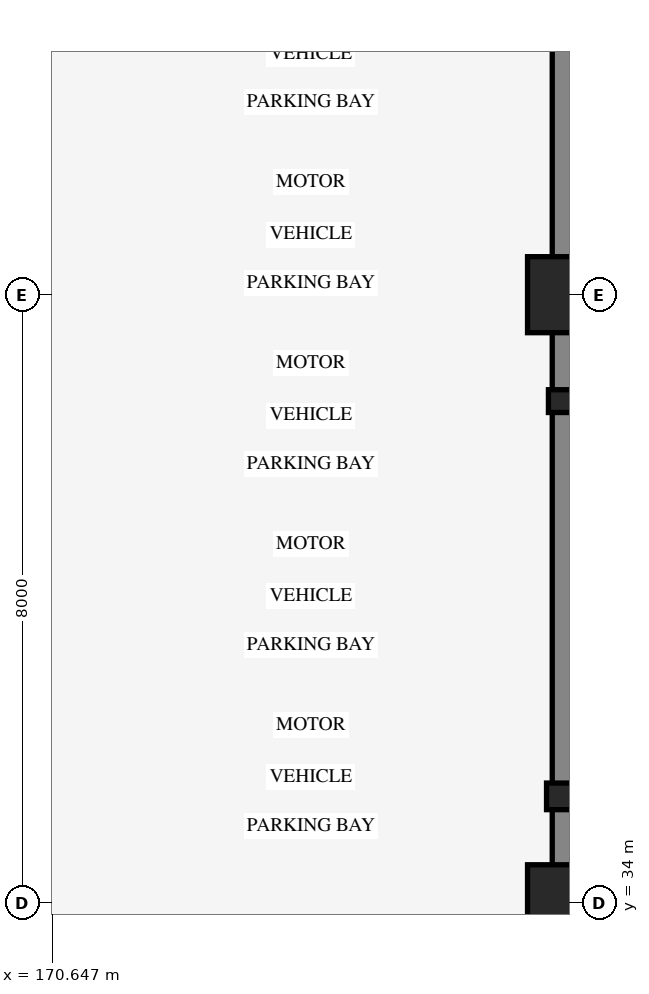
"""IFC4 building model, lengths in metres.
Left out: names, types, materials, properties, quantities, classifications, styles, units other than length and angle.
Written with IfcOpenShell. Run it as: python <this file> out.ifc"""

import sys

from ifc_helpers import new_model, si_unit, direction, frame, frame_2d, origin, origin_2d, place, context, subcontext, project, spatial, rectangle, extrude, element, save


model = new_model("IFC4")
c1 = context("Model", 3, precision=1e-05, world=origin(), true_north=direction((0.0, 1.0)))
c2 = subcontext(c1, "Body", "Model", "MODEL_VIEW")
j1 = project(units=[si_unit("LENGTHUNIT", "METRE"), si_unit("PLANEANGLEUNIT", "RADIAN")], contexts=[c1])
p1 = place(None, origin())
s1 = spatial("IfcSite", under=j1, at=p1, CompositionType="ELEMENT")
p2 = place(p1, origin())
s2 = spatial("IfcBuilding", under=s1, at=p2, CompositionType="ELEMENT")
p3 = place(p2, frame((0.0, 0.0, -9.0)))
s3 = spatial("IfcBuildingStorey", under=s2, at=p3, CompositionType="ELEMENT", Elevation=-9.0)
p4 = place(p3, frame((177.4, 26.0, 0.0), z_axis=(0.0, 0.0, 1.0), x_axis=(0.0, 1.0, 0.0)))
e1 = element("IfcWall", 1, at=p4, inside=s3, PredefinedType="SOLIDWALL", context=c2, shape_type="SweptSolid", body=[
    extrude(rectangle(XDim=80.0, YDim=0.35, at=frame_2d((40.0, 0.0))), origin(), (0.0, 0.0, 1.0), 4.22),
])
for number, where, z_axis, x_axis in (
    (2, (177.4, 34.0, 0.0), (0.0, 0.0, 1.0), (1.0, 0.0, 0.0)),
    (3, (177.4, 42.0, 0.0), (0.0, 0.0, 1.0), (1.0, 0.0, 0.0)),
):
    element("IfcColumn", number, at=place(p3, frame(where, z_axis=z_axis, x_axis=x_axis)), inside=s3, PredefinedType="COLUMN", context=c2, shape_type="SweptSolid", body=[
        extrude(rectangle(XDim=1.0, YDim=1.0, at=origin_2d()), origin(), (0.0, 0.0, 1.0), 4.5),
    ])
p5 = place(p3, frame((177.4, 35.4, 0.0), z_axis=(0.0, 0.0, 1.0), x_axis=(0.0, 1.0, 0.0)))
e4 = element("IfcColumn", 4, at=p5, inside=s3, PredefinedType="PILASTER", context=c2, shape_type="SweptSolid", body=[
    extrude(rectangle(XDim=0.35, YDim=0.5, at=origin_2d()), origin(), (0.0, 0.0, 1.0), 4.5),
])
p6 = place(p3, frame((177.4, 40.6, 0.0), z_axis=(0.0, 0.0, 1.0), x_axis=(0.0, 1.0, 0.0)))
e5 = element("IfcColumn", 5, at=p6, inside=s3, PredefinedType="PILASTER", context=c2, shape_type="SweptSolid", body=[
    extrude(rectangle(XDim=0.3, YDim=0.45, at=origin_2d()), origin(), (0.0, 0.0, 1.0), 4.5),
])
save(model, sys.argv[1])
